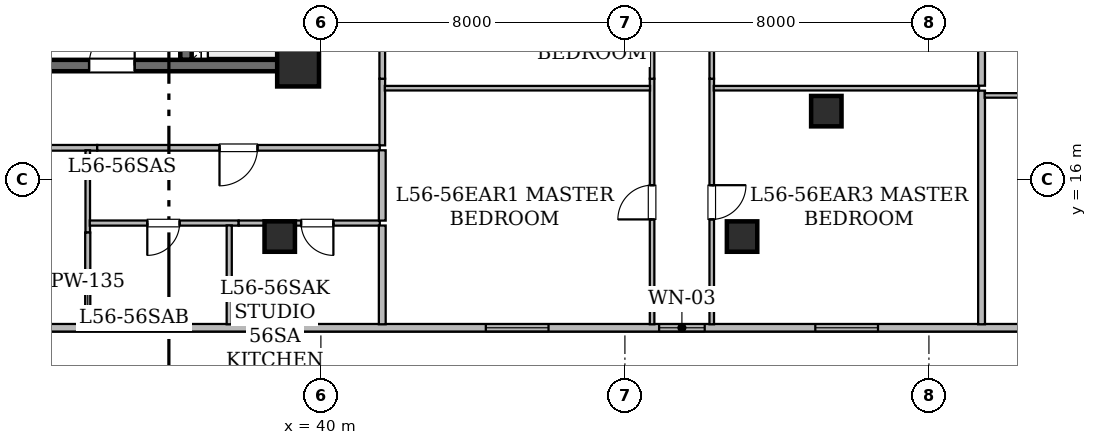
"""IFC4 building model, lengths in metres.
Left out: names, types, materials, properties, quantities, classifications, styles, units other than length and angle.
Written with IfcOpenShell. Run it as: python <this file> out.ifc"""

import sys

from ifc_helpers import new_model, si_unit, direction, frame, frame_2d, origin, origin_2d, place, context, subcontext, project, spatial, rectangle, hollow_rectangle, extrude, element, fill, save


model = new_model("IFC4")
c1 = context("Model", 3, precision=1e-05, world=origin(), true_north=direction((0.0, 1.0)))
c2 = subcontext(c1, "Body", "Model", "MODEL_VIEW")
j1 = project(units=[si_unit("LENGTHUNIT", "METRE"), si_unit("PLANEANGLEUNIT", "RADIAN")], contexts=[c1])
p1 = place(None, origin())
s1 = spatial("IfcSite", under=j1, at=p1, CompositionType="ELEMENT")
p2 = place(p1, origin())
s2 = spatial("IfcBuilding", under=s1, at=p2, CompositionType="ELEMENT")
p3 = place(p2, frame((0.0, 0.0, 220.85)))
s3 = spatial("IfcBuildingStorey", under=s2, at=p3, CompositionType="ELEMENT", Elevation=220.85)
p4 = place(p3, frame((39.4, 19.0, 0.0), z_axis=(0.0, 0.0, 1.0), x_axis=(1.0, 0.0, 0.0)))
e1 = element("IfcColumn", 1, at=p4, inside=s3, PredefinedType="COLUMN", context=c2, shape_type="SweptSolid", body=[
    extrude(hollow_rectangle(XDim=1.1, YDim=1.1, WallThickness=0.055, at=origin_2d()), origin(), (0.0, 0.0, 1.0), 3.65),
])
for number, where, z_axis, x_axis in (
    (2, (38.917, 14.5, 0.0), (0.0, 0.0, 1.0), (1.0, 0.0, 0.0)),
    (3, (51.083, 14.5, 0.0), (0.0, 0.0, 1.0), (1.0, 0.0, 0.0)),
    (4, (53.3, 17.8, 0.0), (0.0, 0.0, 1.0), (1.0, 0.0, 0.0)),
):
    element("IfcColumn", number, at=place(p3, frame(where, z_axis=z_axis, x_axis=x_axis)), inside=s3, PredefinedType="COLUMN", context=c2, shape_type="SweptSolid", body=[
        extrude(hollow_rectangle(XDim=0.8, YDim=0.8, WallThickness=0.04, at=origin_2d()), origin(), (0.0, 0.0, 1.0), 3.65),
    ])
p5 = place(p3, frame((65.696, 12.1, 0.0), z_axis=(0.0, 0.0, 1.0), x_axis=(-1.0, 0.0, 0.0)))
e5 = element("IfcWall", 5, at=p5, inside=s3, PredefinedType="STANDARD", context=c2, shape_type="SweptSolid", body=[
    extrude(rectangle(XDim=41.393, YDim=0.2, at=frame_2d((20.697, 0.0))), origin(), (0.0, 0.0, 1.0), 3.43),
])
p6 = place(p5, frame((34.521, 0.0, 0.85)))
e6 = element("IfcOpeningElement", 6, at=p6, cuts=e5, PredefinedType="OPENING", context=c2, shape_type="SweptSolid", body=[
    extrude(rectangle(XDim=1.65, YDim=1.55, at=frame_2d((0.825, 0.775))), frame((0.0, 0.11, 0.0), z_axis=(0.0, -1.0, 0.0), x_axis=(1.0, 0.0, 0.0)), (0.0, 0.0, 1.0), 0.22),
])
p7 = place(p5, frame((39.14, 0.0, 0.85)))
e7 = element("IfcOpeningElement", 7, at=p7, cuts=e5, PredefinedType="OPENING", context=c2, shape_type="SweptSolid", body=[
    extrude(rectangle(XDim=1.65, YDim=1.55, at=frame_2d((0.825, 0.775))), frame((0.0, 0.11, 0.0), z_axis=(0.0, -1.0, 0.0), x_axis=(1.0, 0.0, 0.0)), (0.0, 0.0, 1.0), 0.22),
])
p8 = place(p5, frame((15.596, 0.0, 0.8)))
e8 = element("IfcOpeningElement", 8, at=p8, cuts=e5, PredefinedType="OPENING", context=c2, shape_type="SweptSolid", body=[
    extrude(rectangle(XDim=1.2, YDim=1.5, at=frame_2d((0.6, 0.75))), frame((0.0, 0.11, 0.0), z_axis=(0.0, -1.0, 0.0), x_axis=(1.0, 0.0, 0.0)), (0.0, 0.0, 1.0), 0.22),
])
p9 = place(p5, frame((19.706, 0.0, 0.85)))
e9 = element("IfcOpeningElement", 9, at=p9, cuts=e5, PredefinedType="OPENING", context=c2, shape_type="SweptSolid", body=[
    extrude(rectangle(XDim=1.65, YDim=1.55, at=frame_2d((0.825, 0.775))), frame((0.0, 0.11, 0.0), z_axis=(0.0, -1.0, 0.0), x_axis=(1.0, 0.0, 0.0)), (0.0, 0.0, 1.0), 0.22),
])
p10 = place(p5, frame((11.036, 0.0, 0.85)))
e10 = element("IfcOpeningElement", 10, at=p10, cuts=e5, PredefinedType="OPENING", context=c2, shape_type="SweptSolid", body=[
    extrude(rectangle(XDim=1.65, YDim=1.55, at=frame_2d((0.825, 0.775))), frame((0.0, 0.11, 0.0), z_axis=(0.0, -1.0, 0.0), x_axis=(1.0, 0.0, 0.0)), (0.0, 0.0, 1.0), 0.22),
])
p11 = place(p5, frame((4.786, 0.0, 0.85)))
e11 = element("IfcOpeningElement", 11, at=p11, cuts=e5, PredefinedType="OPENING", context=c2, shape_type="SweptSolid", body=[
    extrude(rectangle(XDim=1.65, YDim=1.55, at=frame_2d((0.825, 0.775))), frame((0.0, 0.11, 0.0), z_axis=(0.0, -1.0, 0.0), x_axis=(1.0, 0.0, 0.0)), (0.0, 0.0, 1.0), 0.22),
])
p12 = place(p3, frame((29.0, 19.0, 0.0), z_axis=(0.0, 0.0, 1.0), x_axis=(1.0, 0.0, 0.0)))
e12 = element("IfcWall", 12, at=p12, inside=s3, PredefinedType="SHEAR", context=c2, shape_type="SweptSolid", body=[
    extrude(rectangle(XDim=10.4, YDim=0.3, at=frame_2d((5.2, 0.0))), origin(), (0.0, 0.0, 1.0), 3.43),
])
p13 = place(p12, frame((4.9, 0.0, 0.0)))
e13 = element("IfcOpeningElement", 13, at=p13, cuts=e12, PredefinedType="OPENING", context=c2, shape_type="SweptSolid", body=[
    extrude(rectangle(XDim=1.2, YDim=2.15, at=frame_2d((0.6, 1.075))), frame((0.0, 0.16, 0.0), z_axis=(0.0, -1.0, 0.0), x_axis=(1.0, 0.0, 0.0)), (0.0, 0.0, 1.0), 0.32),
])
p14 = place(p3, frame((39.4, 19.0, 0.0), z_axis=(0.0, 0.0, 1.0), x_axis=(0.0, 1.0, 0.0)))
e14 = element("IfcWall", 14, at=p14, inside=s3, PredefinedType="SHEAR", context=c2, shape_type="SweptSolid", body=[
    extrude(rectangle(XDim=5.4, YDim=0.3, at=frame_2d((2.7, 0.0))), origin(), (0.0, 0.0, 1.0), 3.43),
])
p15 = place(p3, frame((36.45, 19.154, 0.0), z_axis=(0.0, 0.0, 1.0), x_axis=(0.0, 1.0, 0.0)))
e15 = element("IfcWall", 15, at=p15, inside=s3, PredefinedType="SHEAR", context=c2, shape_type="SweptSolid", body=[
    extrude(rectangle(XDim=4.696, YDim=0.3, at=frame_2d((2.348, 0.0))), origin(), (0.0, 0.0, 1.0), 3.43),
])
p16 = place(p15, frame((0.696, 0.0, 0.0)))
e16 = element("IfcOpeningElement", 16, at=p16, cuts=e15, PredefinedType="OPENING", context=c2, shape_type="SweptSolid", body=[
    extrude(rectangle(XDim=1.1, YDim=2.15, at=frame_2d((0.55, 1.075))), frame((0.0, 0.16, 0.0), z_axis=(0.0, -1.0, 0.0), x_axis=(1.0, 0.0, 0.0)), (0.0, 0.0, 1.0), 0.32),
])
p17 = place(p15, frame((3.316, 0.0, 0.0)))
e17 = element("IfcOpeningElement", 17, at=p17, cuts=e15, PredefinedType="OPENING", context=c2, shape_type="SweptSolid", body=[
    extrude(rectangle(XDim=1.1, YDim=2.15, at=frame_2d((0.55, 1.075))), frame((0.0, 0.16, 0.0), z_axis=(0.0, -1.0, 0.0), x_axis=(1.0, 0.0, 0.0)), (0.0, 0.0, 1.0), 0.32),
])
p18 = place(p3, frame((34.114, 16.835, 0.0), z_axis=(0.0, 0.0, 1.0), x_axis=(-1.0, 0.0, 0.0)))
e18 = element("IfcWall", 18, at=p18, inside=s3, PredefinedType="STANDARD", context=c2, shape_type="SweptSolid", body=[
    extrude(rectangle(XDim=7.214, YDim=0.15, at=frame_2d((3.607, 0.0))), origin(), (0.0, 0.0, 1.0), 2.725),
])
p19 = place(p18, frame((3.053, 0.0, 0.0)))
e19 = element("IfcOpeningElement", 19, at=p19, cuts=e18, PredefinedType="OPENING", context=c2, shape_type="SweptSolid", body=[
    extrude(rectangle(XDim=1.15, YDim=2.2, at=frame_2d((0.575, 1.1))), frame((0.0, 0.085, 0.0), z_axis=(0.0, -1.0, 0.0), x_axis=(1.0, 0.0, 0.0)), (0.0, 0.0, 1.0), 0.17),
])
p20 = place(p3, frame((41.55, 16.835, 0.0), z_axis=(0.0, 0.0, 1.0), x_axis=(-1.0, 0.0, 0.0)))
e20 = element("IfcWall", 20, at=p20, inside=s3, PredefinedType="STANDARD", context=c2, shape_type="SweptSolid", body=[
    extrude(rectangle(XDim=7.436, YDim=0.15, at=frame_2d((3.718, 0.0))), origin(), (0.0, 0.0, 1.0), 2.725),
])
p21 = place(p20, frame((3.218, 0.0, 0.0)))
e21 = element("IfcOpeningElement", 21, at=p21, cuts=e20, PredefinedType="OPENING", context=c2, shape_type="SweptSolid", body=[
    extrude(rectangle(XDim=1.0, YDim=2.15, at=frame_2d((0.5, 1.075))), frame((0.0, 0.085, 0.0), z_axis=(0.0, -1.0, 0.0), x_axis=(1.0, 0.0, 0.0)), (0.0, 0.0, 1.0), 0.17),
])
p22 = place(p3, frame((41.615, 18.653, 0.0), z_axis=(0.0, 0.0, 1.0), x_axis=(0.0, -1.0, 0.0)))
e22 = element("IfcWall", 22, at=p22, inside=s3, PredefinedType="STANDARD", context=c2, shape_type="SweptSolid", body=[
    extrude(rectangle(XDim=1.753, YDim=0.15, at=frame_2d((0.876, 0.0))), origin(), (0.0, 0.0, 1.0), 2.725),
])
p23 = place(p3, frame((41.615, 25.476, 0.0), z_axis=(0.0, 0.0, 1.0), x_axis=(0.0, -1.0, 0.0)))
e23 = element("IfcWall", 23, at=p23, inside=s3, PredefinedType="STANDARD", context=c2, shape_type="SweptSolid", body=[
    extrude(rectangle(XDim=6.823, YDim=0.15, at=frame_2d((3.412, 0.0))), origin(), (0.0, 0.0, 1.0), 2.725),
])
p24 = place(p3, frame((33.865, 16.77, 0.0), z_axis=(0.0, 0.0, 1.0), x_axis=(0.0, -1.0, 0.0)))
e24 = element("IfcWall", 24, at=p24, inside=s3, PredefinedType="PARTITIONING", context=c2, shape_type="SweptSolid", body=[
    extrude(rectangle(XDim=2.164, YDim=0.12, at=frame_2d((1.082, 0.0))), origin(), (0.0, 0.0, 1.0), 3.065),
])
p25 = place(p3, frame((33.865, 14.606, 0.0), z_axis=(0.0, 0.0, 1.0), x_axis=(0.0, -1.0, 0.0)))
e25 = element("IfcWall", 25, at=p25, inside=s3, PredefinedType="PARTITIONING", context=c2, shape_type="SweptSolid", body=[
    extrude(rectangle(XDim=2.414, YDim=0.135, at=frame_2d((1.207, 0.0))), origin(), (0.0, 0.0, 1.0), 2.887),
])
p26 = place(p3, frame((37.837, 14.855, 0.0), z_axis=(0.0, 0.0, 1.0), x_axis=(-1.0, 0.0, 0.0)))
e26 = element("IfcWall", 26, at=p26, inside=s3, PredefinedType="PARTITIONING", context=c2, shape_type="SweptSolid", body=[
    extrude(rectangle(XDim=3.918, YDim=0.135, at=frame_2d((1.959, 0.0))), origin(), (0.0, 0.0, 1.0), 3.43),
])
p27 = place(p26, frame((1.555, 0.0, 0.0)))
e27 = element("IfcOpeningElement", 27, at=p27, cuts=e26, PredefinedType="OPENING", context=c2, shape_type="SweptSolid", body=[
    extrude(rectangle(XDim=0.85, YDim=2.1, at=frame_2d((0.425, 1.05))), frame((0.0, 0.077, 0.0), z_axis=(0.0, -1.0, 0.0), x_axis=(1.0, 0.0, 0.0)), (0.0, 0.0, 1.0), 0.155),
])
p28 = place(p3, frame((41.55, 14.855, 0.0), z_axis=(0.0, 0.0, 1.0), x_axis=(-1.0, 0.0, 0.0)))
e28 = element("IfcWall", 28, at=p28, inside=s3, PredefinedType="PARTITIONING", context=c2, shape_type="SweptSolid", body=[
    extrude(rectangle(XDim=3.713, YDim=0.135, at=frame_2d((1.856, 0.0))), origin(), (0.0, 0.0, 1.0), 2.725),
])
p29 = place(p28, frame((1.221, 0.0, 0.0)))
e29 = element("IfcOpeningElement", 29, at=p29, cuts=e28, PredefinedType="OPENING", context=c2, shape_type="SweptSolid", body=[
    extrude(rectangle(XDim=0.85, YDim=2.1, at=frame_2d((0.425, 1.05))), frame((0.0, 0.077, 0.0), z_axis=(0.0, -1.0, 0.0), x_axis=(1.0, 0.0, 0.0)), (0.0, 0.0, 1.0), 0.155),
])
p30 = place(p3, frame((41.615, 16.77, 0.0), z_axis=(0.0, 0.0, 1.0), x_axis=(0.0, -1.0, 0.0)))
e30 = element("IfcWall", 30, at=p30, inside=s3, PredefinedType="STANDARD", context=c2, shape_type="SweptSolid", body=[
    extrude(rectangle(XDim=1.85, YDim=0.18, at=frame_2d((0.925, 0.0))), origin(), (0.0, 0.0, 1.0), 3.065),
])
p31 = place(p3, frame((37.588, 14.793, 0.0), z_axis=(0.0, 0.0, 1.0), x_axis=(0.0, -1.0, 0.0)))
e31 = element("IfcWall", 31, at=p31, inside=s3, PredefinedType="PARTITIONING", context=c2, shape_type="SweptSolid", body=[
    extrude(rectangle(XDim=2.601, YDim=0.135, at=frame_2d((1.301, 0.0))), origin(), (0.0, 0.0, 1.0), 2.887),
])
p32 = place(p3, frame((41.615, 14.79, 0.0), z_axis=(0.0, 0.0, 1.0), x_axis=(0.0, -1.0, 0.0)))
e32 = element("IfcWall", 32, at=p32, inside=s3, PredefinedType="STANDARD", context=c2, shape_type="SweptSolid", body=[
    extrude(rectangle(XDim=2.598, YDim=0.18, at=frame_2d((1.299, 0.0))), origin(), (0.0, 0.0, 1.0), 2.887),
])
p33 = place(p3, frame((48.715, 12.192, 0.0), z_axis=(0.0, 0.0, 1.0), x_axis=(0.0, 1.0, 0.0)))
e33 = element("IfcWall", 33, at=p33, inside=s3, PredefinedType="PARTITIONING", context=c2, shape_type="SweptSolid", body=[
    extrude(rectangle(XDim=6.461, YDim=0.12, at=frame_2d((3.23, 0.0))), origin(), (0.0, 0.0, 1.0), 2.725),
])
p34 = place(p33, frame((2.759, 0.0, 0.0)))
e34 = element("IfcOpeningElement", 34, at=p34, cuts=e33, PredefinedType="OPENING", context=c2, shape_type="SweptSolid", body=[
    extrude(rectangle(XDim=0.9, YDim=2.1, at=frame_2d((0.45, 1.05))), frame((0.0, 0.07, 0.0), z_axis=(0.0, -1.0, 0.0), x_axis=(1.0, 0.0, 0.0)), (0.0, 0.0, 1.0), 0.14),
])
p35 = place(p3, frame((48.715, 18.653, 0.0), z_axis=(0.0, 0.0, 1.0), x_axis=(0.0, 1.0, 0.0)))
e35 = element("IfcWall", 35, at=p35, inside=s3, PredefinedType="PARTITIONING", context=c2, shape_type="SweptSolid", body=[
    extrude(rectangle(XDim=7.137, YDim=0.12, at=frame_2d((3.568, 0.0))), origin(), (0.0, 0.0, 1.0), 3.43),
])
p36 = place(p35, frame((3.118, 0.0, 0.0)))
e36 = element("IfcOpeningElement", 36, at=p36, cuts=e35, PredefinedType="OPENING", context=c2, shape_type="SweptSolid", body=[
    extrude(rectangle(XDim=0.9, YDim=2.1, at=frame_2d((0.45, 1.05))), frame((0.0, 0.07, 0.0), z_axis=(0.0, -1.0, 0.0), x_axis=(1.0, 0.0, 0.0)), (0.0, 0.0, 1.0), 0.14),
])
p37 = place(p3, frame((50.285, 18.653, 0.0), z_axis=(0.0, 0.0, 1.0), x_axis=(0.0, -1.0, 0.0)))
e37 = element("IfcWall", 37, at=p37, inside=s3, PredefinedType="PARTITIONING", context=c2, shape_type="SweptSolid", body=[
    extrude(rectangle(XDim=6.461, YDim=0.12, at=frame_2d((3.23, 0.0))), origin(), (0.0, 0.0, 1.0), 2.725),
])
p38 = place(p37, frame((2.801, 0.0, 0.0)))
e38 = element("IfcOpeningElement", 38, at=p38, cuts=e37, PredefinedType="OPENING", context=c2, shape_type="SweptSolid", body=[
    extrude(rectangle(XDim=0.9, YDim=2.1, at=frame_2d((0.45, 1.05))), frame((0.0, 0.07, 0.0), z_axis=(0.0, -1.0, 0.0), x_axis=(1.0, 0.0, 0.0)), (0.0, 0.0, 1.0), 0.14),
])
p39 = place(p3, frame((50.285, 25.79, 0.0), z_axis=(0.0, 0.0, 1.0), x_axis=(0.0, -1.0, 0.0)))
e39 = element("IfcWall", 39, at=p39, inside=s3, PredefinedType="PARTITIONING", context=c2, shape_type="SweptSolid", body=[
    extrude(rectangle(XDim=7.137, YDim=0.12, at=frame_2d((3.568, 0.0))), origin(), (0.0, 0.0, 1.0), 3.43),
])
p40 = place(p39, frame((3.118, 0.0, 0.0)))
e40 = element("IfcOpeningElement", 40, at=p40, cuts=e39, PredefinedType="OPENING", context=c2, shape_type="SweptSolid", body=[
    extrude(rectangle(XDim=0.9, YDim=2.1, at=frame_2d((0.45, 1.05))), frame((0.0, 0.07, 0.0), z_axis=(0.0, -1.0, 0.0), x_axis=(1.0, 0.0, 0.0)), (0.0, 0.0, 1.0), 0.14),
])
p41 = place(p3, frame((41.682, 18.404, 0.0), z_axis=(0.0, 0.0, 1.0), x_axis=(1.0, 0.0, 0.0)))
e41 = element("IfcWall", 41, at=p41, inside=s3, PredefinedType="PARTITIONING", context=c2, shape_type="SweptSolid", body=[
    extrude(rectangle(XDim=6.979, YDim=0.12, at=frame_2d((3.49, 0.0))), origin(), (0.0, 0.0, 1.0), 2.725),
])
p42 = place(p3, frame((50.339, 18.404, 0.0), z_axis=(0.0, 0.0, 1.0), x_axis=(1.0, 0.0, 0.0)))
e42 = element("IfcWall", 42, at=p42, inside=s3, PredefinedType="PARTITIONING", context=c2, shape_type="SweptSolid", body=[
    extrude(rectangle(XDim=6.981, YDim=0.12, at=frame_2d((3.49, 0.0))), origin(), (0.0, 0.0, 1.0), 2.725),
])
p43 = place(p3, frame((57.385, 18.339, 0.0), z_axis=(0.0, 0.0, 1.0), x_axis=(0.0, -1.0, 0.0)))
e43 = element("IfcWall", 43, at=p43, inside=s3, PredefinedType="STANDARD", context=c2, shape_type="SweptSolid", body=[
    extrude(rectangle(XDim=6.147, YDim=0.18, at=frame_2d((3.074, 0.0))), origin(), (0.0, 0.0, 1.0), 2.725),
])
p44 = place(p3, frame((57.385, 25.66, 0.0), z_axis=(0.0, 0.0, 1.0), x_axis=(0.0, -1.0, 0.0)))
e44 = element("IfcWall", 44, at=p44, inside=s3, PredefinedType="STANDARD", context=c2, shape_type="SweptSolid", body=[
    extrude(rectangle(XDim=7.191, YDim=0.18, at=frame_2d((3.595, 0.0))), origin(), (0.0, 0.0, 1.0), 2.725),
])
p45 = place(p3, frame((57.467, 18.214, 0.0), z_axis=(0.0, 0.0, 1.0), x_axis=(1.0, 0.0, 0.0)))
e45 = element("IfcWall", 45, at=p45, inside=s3, PredefinedType="PARTITIONING", context=c2, shape_type="SweptSolid", body=[
    extrude(rectangle(XDim=5.264, YDim=0.12, at=frame_2d((2.632, 0.0))), origin(), (0.0, 0.0, 1.0), 3.43),
])
p46 = place(p8, origin())
e46 = element("IfcWindow", 46, at=p46, inside=s3, PartitioningType="SINGLE_PANEL", PredefinedType="WINDOW", context=c2, shape_type="SweptSolid", body=[
    extrude(rectangle(XDim=1.2, YDim=1.5, at=frame_2d((0.6, 0.75))), frame((0.0, 0.03, 0.0), z_axis=(0.0, -1.0, 0.0), x_axis=(1.0, 0.0, 0.0)), (0.0, 0.0, 1.0), 0.06),
])
fill(e8, e46)
p47 = place(p9, origin())
e47 = element("IfcWindow", 47, at=p47, inside=s3, PartitioningType="SINGLE_PANEL", PredefinedType="WINDOW", context=c2, shape_type="SweptSolid", body=[
    extrude(rectangle(XDim=1.65, YDim=1.55, at=frame_2d((0.825, 0.775))), frame((0.0, 0.03, 0.0), z_axis=(0.0, -1.0, 0.0), x_axis=(1.0, 0.0, 0.0)), (0.0, 0.0, 1.0), 0.06),
])
fill(e9, e47)
p48 = place(p10, origin())
e48 = element("IfcWindow", 48, at=p48, inside=s3, PartitioningType="SINGLE_PANEL", PredefinedType="WINDOW", context=c2, shape_type="SweptSolid", body=[
    extrude(rectangle(XDim=1.65, YDim=1.55, at=frame_2d((0.825, 0.775))), frame((0.0, 0.03, 0.0), z_axis=(0.0, -1.0, 0.0), x_axis=(1.0, 0.0, 0.0)), (0.0, 0.0, 1.0), 0.06),
])
fill(e10, e48)
p49 = place(p13, origin())
e49 = element("IfcDoor", 49, at=p49, inside=s3, OperationType="SINGLE_SWING_RIGHT", PredefinedType="DOOR", context=c2, shape_type="SweptSolid", body=[
    extrude(rectangle(XDim=1.2, YDim=2.15, at=frame_2d((0.6, 1.075))), frame((0.0, 0.025, 0.0), z_axis=(0.0, -1.0, 0.0), x_axis=(1.0, 0.0, 0.0)), (0.0, 0.0, 1.0), 0.05),
])
fill(e13, e49)
p50 = place(p21, origin())
e50 = element("IfcDoor", 50, at=p50, inside=s3, OperationType="SINGLE_SWING_RIGHT", PredefinedType="DOOR", context=c2, shape_type="SweptSolid", body=[
    extrude(rectangle(XDim=1.0, YDim=2.15, at=frame_2d((0.5, 1.075))), frame((0.0, 0.025, 0.0), z_axis=(0.0, -1.0, 0.0), x_axis=(1.0, 0.0, 0.0)), (0.0, 0.0, 1.0), 0.05),
])
fill(e21, e50)
p51 = place(p27, origin())
e51 = element("IfcDoor", 51, at=p51, inside=s3, OperationType="SINGLE_SWING_RIGHT", PredefinedType="DOOR", context=c2, shape_type="SweptSolid", body=[
    extrude(rectangle(XDim=0.85, YDim=2.1, at=frame_2d((0.425, 1.05))), frame((0.0, 0.025, 0.0), z_axis=(0.0, -1.0, 0.0), x_axis=(1.0, 0.0, 0.0)), (0.0, 0.0, 1.0), 0.05),
])
fill(e27, e51)
p52 = place(p29, origin())
e52 = element("IfcDoor", 52, at=p52, inside=s3, OperationType="SINGLE_SWING_LEFT", PredefinedType="DOOR", context=c2, shape_type="SweptSolid", body=[
    extrude(rectangle(XDim=0.85, YDim=2.1, at=frame_2d((0.425, 1.05))), frame((0.0, 0.025, 0.0), z_axis=(0.0, -1.0, 0.0), x_axis=(1.0, 0.0, 0.0)), (0.0, 0.0, 1.0), 0.05),
])
fill(e29, e52)
p53 = place(p34, origin())
e53 = element("IfcDoor", 53, at=p53, inside=s3, OperationType="SINGLE_SWING_LEFT", PredefinedType="DOOR", context=c2, shape_type="SweptSolid", body=[
    extrude(rectangle(XDim=0.9, YDim=2.1, at=frame_2d((0.45, 1.05))), frame((0.0, 0.025, 0.0), z_axis=(0.0, -1.0, 0.0), x_axis=(1.0, 0.0, 0.0)), (0.0, 0.0, 1.0), 0.05),
])
fill(e34, e53)
p54 = place(p38, origin())
e54 = element("IfcDoor", 54, at=p54, inside=s3, OperationType="SINGLE_SWING_LEFT", PredefinedType="DOOR", context=c2, shape_type="SweptSolid", body=[
    extrude(rectangle(XDim=0.9, YDim=2.1, at=frame_2d((0.45, 1.05))), frame((0.0, 0.025, 0.0), z_axis=(0.0, -1.0, 0.0), x_axis=(1.0, 0.0, 0.0)), (0.0, 0.0, 1.0), 0.05),
])
fill(e38, e54)
save(model, sys.argv[1])
